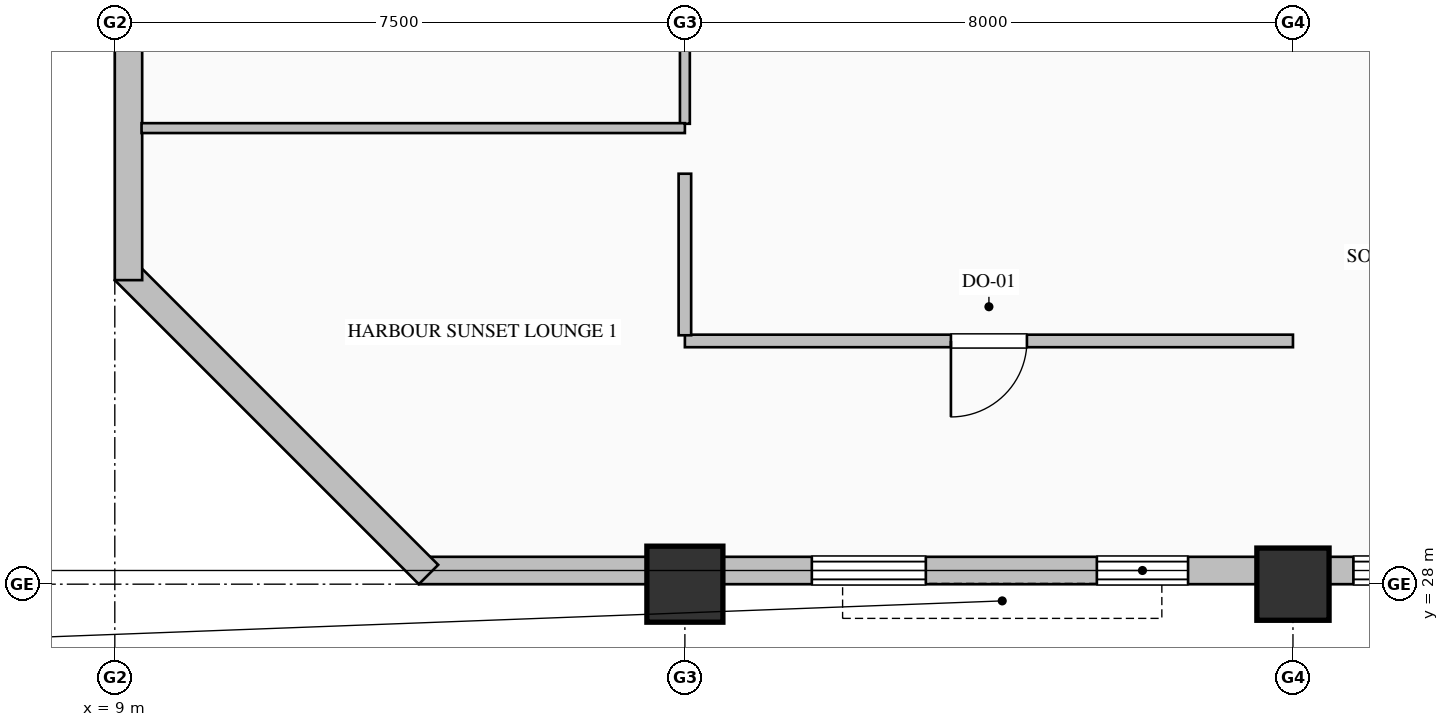
"""IFC4 building model, lengths in metres.
Left out: names, types, materials, properties, quantities, classifications, styles, units other than length and angle.
Written with IfcOpenShell. Run it as: python <this file> out.ifc"""

import sys

from ifc_helpers import new_model, si_unit, direction, frame, frame_2d, origin, origin_2d, place, context, subcontext, project, spatial, rectangle, hollow_rectangle, hollow_circle, extrude, element, fill, save


model = new_model("IFC4")
c1 = context("Model", 3, precision=1e-05, world=origin(), true_north=direction((0.0, 1.0)))
c2 = subcontext(c1, "Body", "Model", "MODEL_VIEW")
j1 = project(units=[si_unit("LENGTHUNIT", "METRE"), si_unit("PLANEANGLEUNIT", "RADIAN")], contexts=[c1])
p1 = place(None, origin())
s1 = spatial("IfcSite", under=j1, at=p1, CompositionType="ELEMENT")
p2 = place(p1, origin())
s2 = spatial("IfcBuilding", under=s1, at=p2, CompositionType="ELEMENT")
p3 = place(p2, frame((0.0, 0.0, 163.0)))
s3 = spatial("IfcBuildingStorey", under=s2, at=p3, CompositionType="ELEMENT", Elevation=163.0)
p4 = place(p3, frame((16.5, 28.0, 0.0), z_axis=(0.0, 0.0, 1.0), x_axis=(1.0, 0.0, 0.0)))
e1 = element("IfcColumn", 1, at=p4, inside=s3, PredefinedType="COLUMN", context=c2, shape_type="SweptSolid", body=[
    extrude(hollow_circle(Radius=0.5, WallThickness=0.036, at=origin_2d()), origin(), (0.0, 0.0, 1.0), 4.0),
])
p5 = place(p3, frame((24.5, 28.0, 0.0), z_axis=(0.0, 0.0, 1.0), x_axis=(1.0, 0.0, 0.0)))
e2 = element("IfcColumn", 2, at=p5, inside=s3, PredefinedType="COLUMN", context=c2, shape_type="SweptSolid", body=[
    extrude(hollow_rectangle(XDim=0.95, YDim=0.95, WallThickness=0.036, at=origin_2d()), origin(), (0.0, 0.0, 1.0), 4.0),
])
p6 = place(p3, frame((40.52, 28.18, 0.0), z_axis=(0.0, 0.0, 1.0), x_axis=(-1.0, 0.0, 0.0)))
e3 = element("IfcWall", 3, at=p6, inside=s3, PredefinedType="SOLIDWALL", context=c2, shape_type="SweptSolid", body=[
    extrude(rectangle(XDim=27.52, YDim=0.36, at=frame_2d((13.76, 0.0))), origin(), (0.0, 0.0, 1.0), 3.165),
])
p7 = place(p6, frame((2.775, 0.0, 0.85)))
e4 = element("IfcOpeningElement", 4, at=p7, cuts=e3, PredefinedType="OPENING", context=c2, shape_type="SweptSolid", body=[
    extrude(rectangle(XDim=1.65, YDim=1.95, at=frame_2d((0.825, 0.975))), frame((0.0, 0.19, 0.0), z_axis=(0.0, -1.0, 0.0), x_axis=(1.0, 0.0, 0.0)), (0.0, 0.0, 1.0), 0.38),
])
p8 = place(p6, frame((10.05, 0.0, 0.85)))
e5 = element("IfcOpeningElement", 5, at=p8, cuts=e3, PredefinedType="OPENING", context=c2, shape_type="SweptSolid", body=[
    extrude(rectangle(XDim=1.5, YDim=1.95, at=frame_2d((0.75, 0.975))), frame((0.0, 0.19, 0.0), z_axis=(0.0, -1.0, 0.0), x_axis=(1.0, 0.0, 0.0)), (0.0, 0.0, 1.0), 0.38),
])
p9 = place(p6, frame((13.575, 0.0, 0.85)))
e6 = element("IfcOpeningElement", 6, at=p9, cuts=e3, PredefinedType="OPENING", context=c2, shape_type="SweptSolid", body=[
    extrude(rectangle(XDim=1.65, YDim=1.95, at=frame_2d((0.825, 0.975))), frame((0.0, 0.19, 0.0), z_axis=(0.0, -1.0, 0.0), x_axis=(1.0, 0.0, 0.0)), (0.0, 0.0, 1.0), 0.38),
])
p10 = place(p6, frame((17.4, 0.0, 0.7)))
e7 = element("IfcOpeningElement", 7, at=p10, cuts=e3, PredefinedType="OPENING", context=c2, shape_type="SweptSolid", body=[
    extrude(rectangle(XDim=1.2, YDim=1.85, at=frame_2d((0.6, 0.925))), frame((0.0, 0.19, 0.0), z_axis=(0.0, -1.0, 0.0), x_axis=(1.0, 0.0, 0.0)), (0.0, 0.0, 1.0), 0.38),
])
p11 = place(p6, frame((20.85, 0.0, 0.85)))
e8 = element("IfcOpeningElement", 8, at=p11, cuts=e3, PredefinedType="OPENING", context=c2, shape_type="SweptSolid", body=[
    extrude(rectangle(XDim=1.5, YDim=1.95, at=frame_2d((0.75, 0.975))), frame((0.0, 0.19, 0.0), z_axis=(0.0, -1.0, 0.0), x_axis=(1.0, 0.0, 0.0)), (0.0, 0.0, 1.0), 0.38),
])
p12 = place(p3, frame((13.127, 28.127, 0.0), z_axis=(0.0, 0.0, 1.0), x_axis=(-0.707106781187, 0.707106781187, 0.0)))
e9 = element("IfcWall", 9, at=p12, inside=s3, PredefinedType="SOLIDWALL", context=c2, shape_type="SweptSolid", body=[
    extrude(rectangle(XDim=5.657, YDim=0.36, at=frame_2d((2.828, 0.0))), origin(), (0.0, 0.0, 1.0), 3.765),
])
p13 = place(p3, frame((9.18, 32.0, 0.0), z_axis=(0.0, 0.0, 1.0), x_axis=(0.0, 1.0, 0.0)))
e10 = element("IfcWall", 10, at=p13, inside=s3, PredefinedType="SOLIDWALL", context=c2, shape_type="SweptSolid", body=[
    extrude(rectangle(XDim=16.0, YDim=0.36, at=frame_2d((8.0, 0.0))), origin(), (0.0, 0.0, 1.0), 3.265),
])
p14 = place(p13, frame((6.375, 0.0, 0.85)))
e11 = element("IfcOpeningElement", 11, at=p14, cuts=e10, PredefinedType="OPENING", context=c2, shape_type="SweptSolid", body=[
    extrude(rectangle(XDim=1.65, YDim=1.95, at=frame_2d((0.825, 0.975))), frame((0.0, 0.19, 0.0), z_axis=(0.0, -1.0, 0.0), x_axis=(1.0, 0.0, 0.0)), (0.0, 0.0, 1.0), 0.38),
])
p15 = place(p3, frame((24.5, 31.2, 0.0), z_axis=(0.0, 0.0, 1.0), x_axis=(-1.0, 0.0, 0.0)))
e12 = element("IfcWall", 12, at=p15, inside=s3, PredefinedType="PARTITIONING", context=c2, shape_type="SweptSolid", body=[
    extrude(rectangle(XDim=8.0, YDim=0.165, at=frame_2d((4.0, 0.0))), origin(), (0.0, 0.0, 1.0), 3.765),
])
p16 = place(p15, frame((3.5, 0.0, 0.0)))
e13 = element("IfcOpeningElement", 13, at=p16, cuts=e12, PredefinedType="OPENING", context=c2, shape_type="SweptSolid", body=[
    extrude(rectangle(XDim=1.0, YDim=2.15, at=frame_2d((0.5, 1.075))), frame((0.0, 0.093, 0.0), z_axis=(0.0, -1.0, 0.0), x_axis=(1.0, 0.0, 0.0)), (0.0, 0.0, 1.0), 0.185),
])
p17 = place(p3, frame((16.5, 31.274, 0.0), z_axis=(0.0, 0.0, 1.0), x_axis=(0.0, 1.0, 0.0)))
e14 = element("IfcWall", 14, at=p17, inside=s3, PredefinedType="PARTITIONING", context=c2, shape_type="SweptSolid", body=[
    extrude(rectangle(XDim=2.125, YDim=0.165, at=frame_2d((1.063, 0.0))), origin(), (0.0, 0.0, 1.0), 3.157),
])
p18 = place(p3, frame((16.5, 34.057, 0.0), z_axis=(0.0, 0.0, 1.0), x_axis=(0.0, 1.0, 0.0)))
e15 = element("IfcWall", 15, at=p18, inside=s3, PredefinedType="PARTITIONING", context=c2, shape_type="SweptSolid", body=[
    extrude(rectangle(XDim=6.286, YDim=0.13, at=frame_2d((3.143, 0.0))), origin(), (0.0, 0.0, 1.0), 3.157),
])
p19 = place(p18, frame((2.643, 0.0, 0.0)))
e16 = element("IfcOpeningElement", 16, at=p19, cuts=e15, PredefinedType="OPENING", context=c2, shape_type="SweptSolid", body=[
    extrude(rectangle(XDim=1.0, YDim=2.15, at=frame_2d((0.5, 1.075))), frame((0.0, 0.075, 0.0), z_axis=(0.0, -1.0, 0.0), x_axis=(1.0, 0.0, 0.0)), (0.0, 0.0, 1.0), 0.15),
])
p20 = place(p3, frame((9.352, 34.0, 0.0), z_axis=(0.0, 0.0, 1.0), x_axis=(1.0, 0.0, 0.0)))
e17 = element("IfcWall", 17, at=p20, inside=s3, PredefinedType="PARTITIONING", context=c2, shape_type="SweptSolid", body=[
    extrude(rectangle(XDim=7.148, YDim=0.13, at=frame_2d((3.574, 0.0))), origin(), (0.0, 0.0, 1.0), 3.765),
])
p21 = place(p9, origin())
e18 = element("IfcWindow", 18, at=p21, inside=s3, PartitioningType="DOUBLE_PANEL_VERTICAL", PredefinedType="WINDOW", context=c2, shape_type="SweptSolid", body=[
    extrude(rectangle(XDim=1.65, YDim=1.95, at=frame_2d((0.825, 0.975))), frame((0.0, 0.15, 0.0), z_axis=(0.0, -1.0, 0.0), x_axis=(1.0, 0.0, 0.0)), (0.0, 0.0, 1.0), 0.06),
])
fill(e6, e18)
p22 = place(p10, origin())
e19 = element("IfcWindow", 19, at=p22, inside=s3, PartitioningType="DOUBLE_PANEL_VERTICAL", PredefinedType="WINDOW", context=c2, shape_type="SweptSolid", body=[
    extrude(rectangle(XDim=1.2, YDim=1.85, at=frame_2d((0.6, 0.925))), frame((0.0, 0.15, 0.0), z_axis=(0.0, -1.0, 0.0), x_axis=(1.0, 0.0, 0.0)), (0.0, 0.0, 1.0), 0.06),
])
fill(e7, e19)
p23 = place(p11, origin())
e20 = element("IfcWindow", 20, at=p23, inside=s3, PartitioningType="DOUBLE_PANEL_VERTICAL", PredefinedType="WINDOW", context=c2, shape_type="SweptSolid", body=[
    extrude(rectangle(XDim=1.5, YDim=1.95, at=frame_2d((0.75, 0.975))), frame((0.0, 0.15, 0.0), z_axis=(0.0, -1.0, 0.0), x_axis=(1.0, 0.0, 0.0)), (0.0, 0.0, 1.0), 0.06),
])
fill(e8, e20)
p24 = place(p16, origin())
e21 = element("IfcDoor", 21, at=p24, inside=s3, OperationType="SINGLE_SWING_RIGHT", PredefinedType="DOOR", context=c2, shape_type="SweptSolid", body=[
    extrude(rectangle(XDim=1.0, YDim=2.15, at=frame_2d((0.5, 1.075))), frame((0.0, 0.025, 0.0), z_axis=(0.0, -1.0, 0.0), x_axis=(1.0, 0.0, 0.0)), (0.0, 0.0, 1.0), 0.05),
])
fill(e13, e21)
save(model, sys.argv[1])
